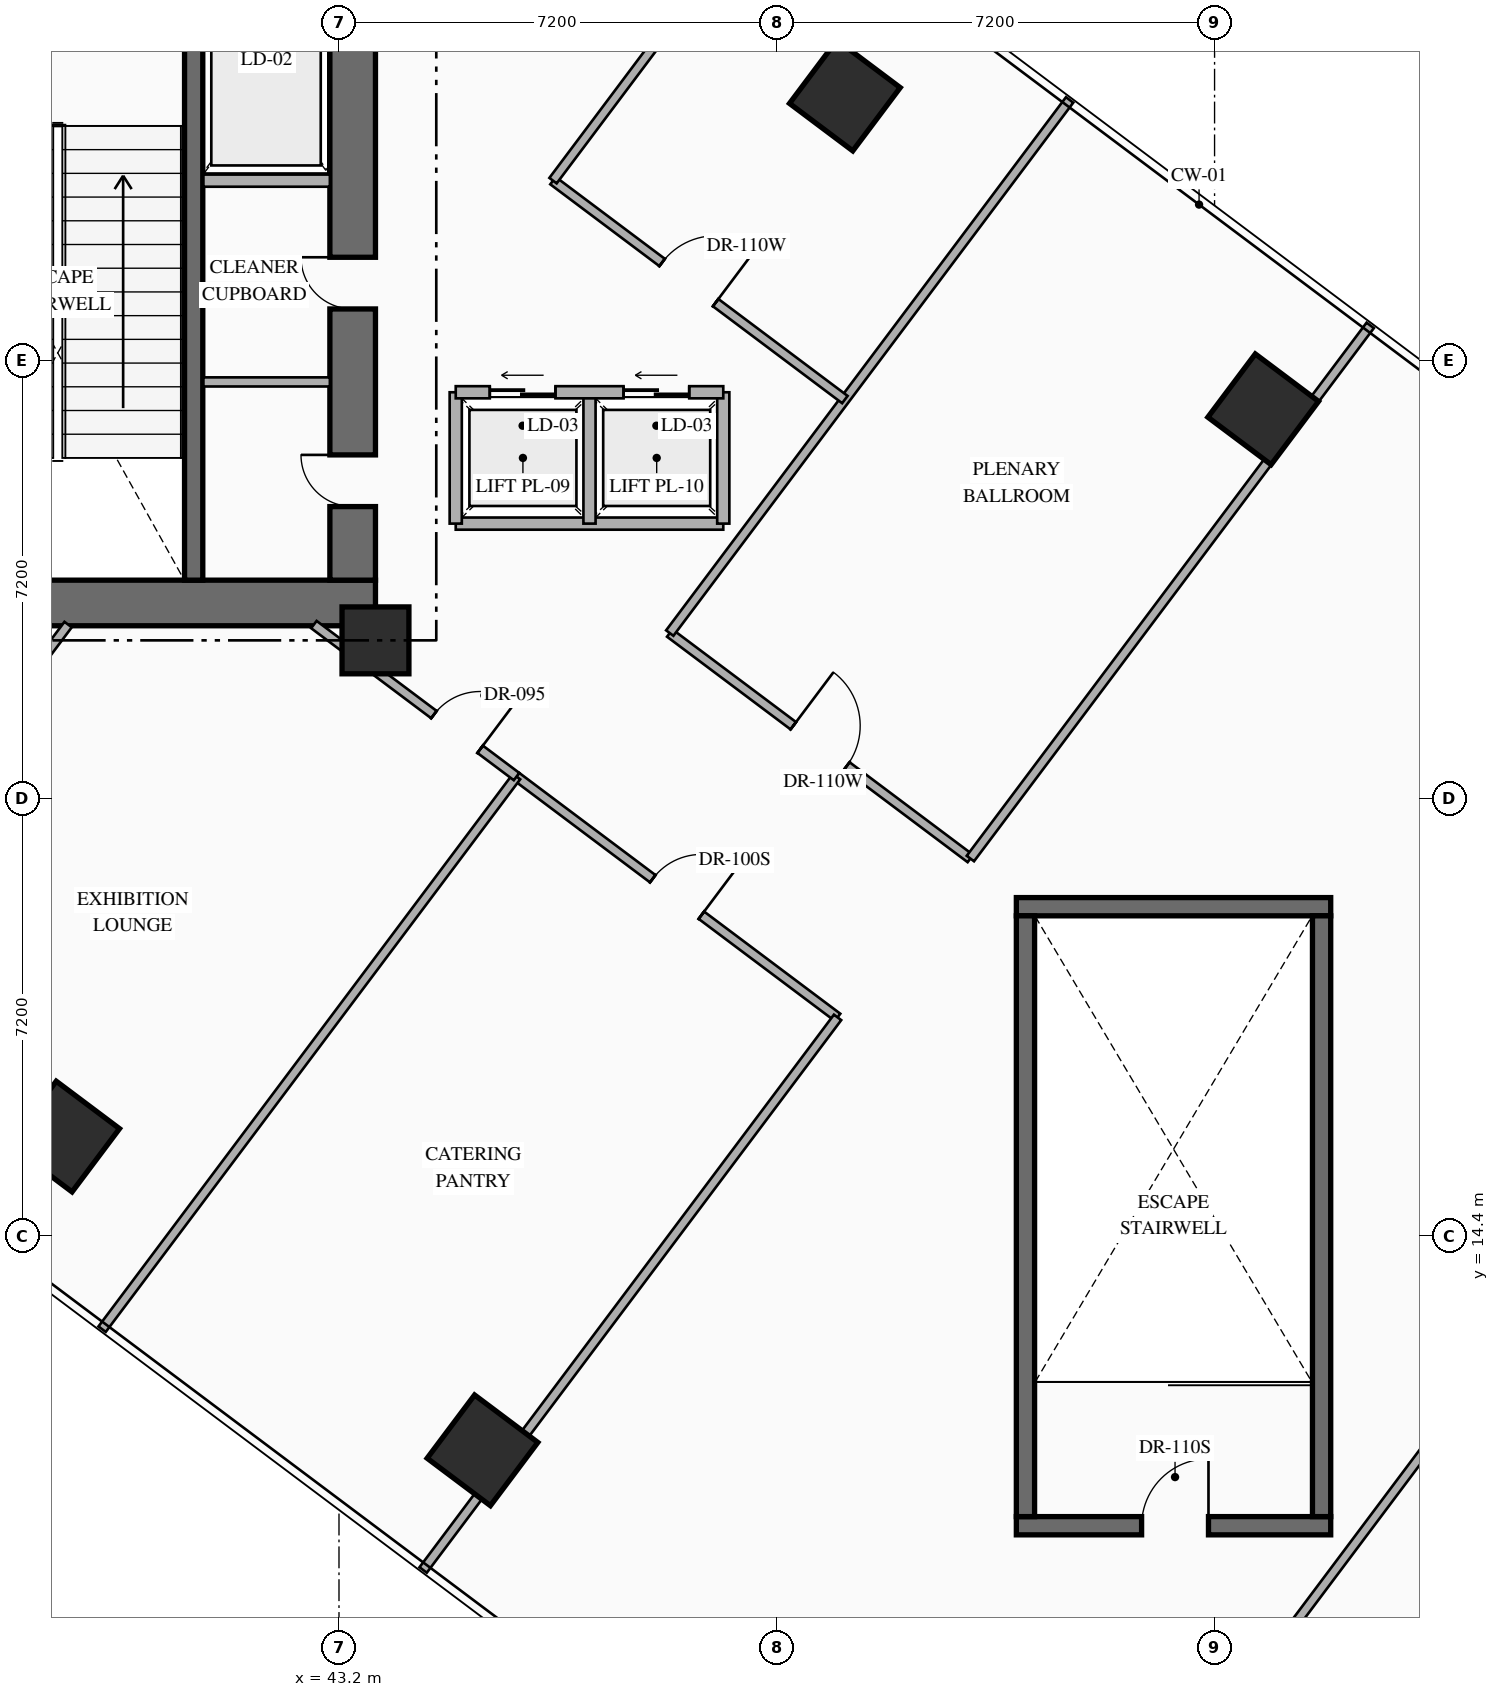
"""IFC4 building model, lengths in metres.
Left out: names, types, materials, properties, quantities, classifications, styles, units other than length and angle.
Written with IfcOpenShell. Run it as: python <this file> out.ifc"""

import sys

from ifc_helpers import new_model, si_unit, direction, frame, frame_2d, origin, origin_2d, place, context, subcontext, project, spatial, rectangle, extrude, element, fill, save


model = new_model("IFC4")
c1 = context("Model", 3, precision=1e-05, world=origin(), true_north=direction((0.0, 1.0)))
c2 = subcontext(c1, "Body", "Model", "MODEL_VIEW")
j1 = project(units=[si_unit("LENGTHUNIT", "METRE"), si_unit("PLANEANGLEUNIT", "RADIAN")], contexts=[c1])
p1 = place(None, origin())
s1 = spatial("IfcSite", under=j1, at=p1, CompositionType="ELEMENT")
p2 = place(p1, origin())
s2 = spatial("IfcBuilding", under=s1, at=p2, CompositionType="ELEMENT")
p3 = place(p2, frame((0.0, 0.0, 21.6)))
s3 = spatial("IfcBuildingStorey", under=s2, at=p3, CompositionType="ELEMENT", Elevation=21.6)
p4 = place(p3, frame((35.74, 24.815, 0.0), z_axis=(0.0, 0.0, 1.0), x_axis=(1.0, 0.0, 0.0)))
e1 = element("IfcWall", 1, at=p4, inside=s3, PredefinedType="SHEAR", context=c2, shape_type="SweptSolid", body=[
    extrude(rectangle(XDim=8.06, YDim=0.75, at=frame_2d((4.03, 0.0))), origin(), (0.0, 0.0, 1.0), 5.4),
])
p5 = place(p3, frame((43.425, 25.19, 0.0), z_axis=(0.0, 0.0, 1.0), x_axis=(0.0, 1.0, 0.0)))
e2 = element("IfcWall", 2, at=p5, inside=s3, PredefinedType="SHEAR", context=c2, shape_type="SweptSolid", body=[
    extrude(rectangle(XDim=9.48, YDim=0.75, at=frame_2d((4.74, 0.0))), origin(), (0.0, 0.0, 1.0), 5.4),
])
p6 = place(p5, frame((1.21, 0.0, 0.0)))
e3 = element("IfcOpeningElement", 3, at=p6, cuts=e2, PredefinedType="OPENING", context=c2, shape_type="SweptSolid", body=[
    extrude(rectangle(XDim=0.85, YDim=2.08, at=frame_2d((0.425, 1.04))), frame((0.0, 0.385, 0.0), z_axis=(0.0, -1.0, 0.0), x_axis=(1.0, 0.0, 0.0)), (0.0, 0.0, 1.0), 0.77),
])
p7 = place(p5, frame((4.46, 0.0, 0.0)))
e4 = element("IfcOpeningElement", 4, at=p7, cuts=e2, PredefinedType="OPENING", context=c2, shape_type="SweptSolid", body=[
    extrude(rectangle(XDim=0.85, YDim=2.08, at=frame_2d((0.425, 1.04))), frame((0.0, 0.385, 0.0), z_axis=(0.0, -1.0, 0.0), x_axis=(1.0, 0.0, 0.0)), (0.0, 0.0, 1.0), 0.77),
])
p8 = place(p3, frame((40.81, 25.19, 0.0), z_axis=(0.0, 0.0, 1.0), x_axis=(0.0, 1.0, 0.0)))
e5 = element("IfcWall", 5, at=p8, inside=s3, PredefinedType="SHEAR", context=c2, shape_type="SweptSolid", body=[
    extrude(rectangle(XDim=9.48, YDim=0.3, at=frame_2d((4.74, 0.0))), origin(), (0.0, 0.0, 1.0), 5.4),
])
p9 = place(p3, frame((54.34, 9.64, 0.0), z_axis=(0.0, 0.0, 1.0), x_axis=(1.0, 0.0, 0.0)))
e6 = element("IfcWall", 6, at=p9, inside=s3, PredefinedType="SHEAR", context=c2, shape_type="SweptSolid", body=[
    extrude(rectangle(XDim=5.17, YDim=0.3, at=frame_2d((2.585, 0.0))), origin(), (0.0, 0.0, 1.0), 5.1),
])
p10 = place(p9, frame((2.06, 0.0, 0.0)))
e7 = element("IfcOpeningElement", 7, at=p10, cuts=e6, PredefinedType="OPENING", context=c2, shape_type="SweptSolid", body=[
    extrude(rectangle(XDim=1.1, YDim=2.2, at=frame_2d((0.55, 1.1))), frame((0.0, 0.16, 0.0), z_axis=(0.0, -1.0, 0.0), x_axis=(1.0, 0.0, 0.0)), (0.0, 0.0, 1.0), 0.32),
])
p11 = place(p3, frame((54.34, 19.82, 0.0), z_axis=(0.0, 0.0, 1.0), x_axis=(1.0, 0.0, 0.0)))
e8 = element("IfcWall", 8, at=p11, inside=s3, PredefinedType="SHEAR", context=c2, shape_type="SweptSolid", body=[
    extrude(rectangle(XDim=5.17, YDim=0.3, at=frame_2d((2.585, 0.0))), origin(), (0.0, 0.0, 1.0), 5.1),
])
for number, where, z_axis, x_axis in (
    (9, (54.49, 9.79, 0.0), (0.0, 0.0, 1.0), (0.0, 1.0, 0.0)),
    (10, (59.36, 9.79, 0.0), (0.0, 0.0, 1.0), (0.0, 1.0, 0.0)),
):
    element("IfcWall", number, at=place(p3, frame(where, z_axis=z_axis, x_axis=x_axis)), inside=s3, PredefinedType="SHEAR", context=c2, shape_type="SweptSolid", body=[
        extrude(rectangle(XDim=9.88, YDim=0.3, at=frame_2d((4.94, 0.0))), origin(), (0.0, 0.0, 1.0), 5.1),
    ])
p12 = place(p3, frame((43.8, 24.2, 0.0), z_axis=(0.0, 0.0, 1.0), x_axis=(1.0, 0.0, 0.0)))
e11 = element("IfcColumn", 11, at=p12, inside=s3, PredefinedType="COLUMN", context=c2, shape_type="SweptSolid", body=[
    extrude(rectangle(XDim=1.1, YDim=1.1, at=origin_2d()), origin(), (0.0, 0.0, 1.0), 5.4),
])
for number, where, z_axis, x_axis in (
    (12, (38.68, 16.04, 0.0), (0.0, 0.0, 1.0), (0.8, -0.6, 0.0)),
    (13, (51.52, 33.16, 0.0), (0.0, 0.0, 1.0), (0.8, -0.6, 0.0)),
    (14, (45.56, 10.88, 0.0), (0.0, 0.0, 1.0), (0.8, -0.6, 0.0)),
    (15, (58.4, 28.0, 0.0), (0.0, 0.0, 1.0), (0.8, -0.6, 0.0)),
):
    element("IfcColumn", number, at=place(p3, frame(where, z_axis=z_axis, x_axis=x_axis)), inside=s3, PredefinedType="COLUMN", context=c2, shape_type="SweptSolid", body=[
        extrude(rectangle(XDim=1.3, YDim=1.3, at=origin_2d()), origin(), (0.0, 0.0, 1.0), 5.4),
    ])
p13 = place(p3, frame((40.97, 31.76, 0.0), z_axis=(0.0, 0.0, 1.0), x_axis=(1.0, 0.0, 0.0)))
e16 = element("IfcWall", 16, at=p13, inside=s3, PredefinedType="STANDARD", context=c2, shape_type="SweptSolid", body=[
    extrude(rectangle(XDim=2.08, YDim=0.2, at=frame_2d((1.04, 0.0))), origin(), (0.0, 0.0, 1.0), 5.1),
])
p14 = place(p3, frame((40.97, 28.45, 0.0), z_axis=(0.0, 0.0, 1.0), x_axis=(1.0, 0.0, 0.0)))
e17 = element("IfcWall", 17, at=p14, inside=s3, PredefinedType="PARTITIONING", context=c2, shape_type="SweptSolid", body=[
    extrude(rectangle(XDim=2.08, YDim=0.15, at=frame_2d((1.04, 0.0))), origin(), (0.0, 0.0, 1.0), 5.1),
])
p15 = place(p3, frame((45.12, 26.12, 0.0), z_axis=(0.0, 0.0, 1.0), x_axis=(1.0, 0.0, 0.0)))
e18 = element("IfcWall", 18, at=p15, inside=s3, PredefinedType="STANDARD", context=c2, shape_type="SweptSolid", body=[
    extrude(rectangle(XDim=4.4, YDim=0.2, at=frame_2d((2.2, 0.0))), origin(), (0.0, 0.0, 1.0), 5.1),
])
for number, where, z_axis, x_axis in (
    (19, (45.12, 26.12, 0.0), (0.0, 0.0, 1.0), (0.0, 1.0, 0.0)),
    (20, (49.52, 26.12, 0.0), (0.0, 0.0, 1.0), (0.0, 1.0, 0.0)),
    (21, (47.32, 26.12, 0.0), (0.0, 0.0, 1.0), (0.0, 1.0, 0.0)),
):
    element("IfcWall", number, at=place(p3, frame(where, z_axis=z_axis, x_axis=x_axis)), inside=s3, PredefinedType="STANDARD", context=c2, shape_type="SweptSolid", body=[
        extrude(rectangle(XDim=2.16, YDim=0.2, at=frame_2d((1.08, 0.0))), origin(), (0.0, 0.0, 1.0), 5.1),
    ])
p16 = place(p3, frame((45.12, 28.28, 0.0), z_axis=(0.0, 0.0, 1.0), x_axis=(1.0, 0.0, 0.0)))
e22 = element("IfcWall", 22, at=p16, inside=s3, PredefinedType="STANDARD", context=c2, shape_type="SweptSolid", body=[
    extrude(rectangle(XDim=4.4, YDim=0.2, at=frame_2d((2.2, 0.0))), origin(), (0.0, 0.0, 1.0), 5.1),
])
p17 = place(p16, frame((0.56, 0.0, 0.0)))
e23 = element("IfcOpeningElement", 23, at=p17, cuts=e22, PredefinedType="OPENING", context=c2, shape_type="SweptSolid", body=[
    extrude(rectangle(XDim=1.08, YDim=2.15, at=frame_2d((0.54, 1.075))), frame((0.0, 0.11, 0.0), z_axis=(0.0, -1.0, 0.0), x_axis=(1.0, 0.0, 0.0)), (0.0, 0.0, 1.0), 0.22),
])
p18 = place(p16, frame((2.76, 0.0, 0.0)))
e24 = element("IfcOpeningElement", 24, at=p18, cuts=e22, PredefinedType="OPENING", context=c2, shape_type="SweptSolid", body=[
    extrude(rectangle(XDim=1.08, YDim=2.15, at=frame_2d((0.54, 1.075))), frame((0.0, 0.11, 0.0), z_axis=(0.0, -1.0, 0.0), x_axis=(1.0, 0.0, 0.0)), (0.0, 0.0, 1.0), 0.22),
])
p19 = place(p3, frame((48.64, 24.32, 0.0), z_axis=(0.0, 0.0, 1.0), x_axis=(0.80000474051, -0.599993679268, 0.0)))
e25 = element("IfcWall", 25, at=p19, inside=s3, PredefinedType="PARTITIONING", context=c2, shape_type="SweptSolid", body=[
    extrude(rectangle(XDim=6.18, YDim=0.15, at=frame_2d((3.09, 0.0))), origin(), (0.0, 0.0, 1.0), 5.1),
])
p20 = place(p19, frame((2.54, 0.0, 0.0)))
e26 = element("IfcOpeningElement", 26, at=p20, cuts=e25, PredefinedType="OPENING", context=c2, shape_type="SweptSolid", body=[
    extrude(rectangle(XDim=1.1, YDim=2.16, at=frame_2d((0.55, 1.08))), frame((0.0, 0.085, 0.0), z_axis=(0.0, -1.0, 0.0), x_axis=(1.0, 0.0, 0.0)), (0.0, 0.0, 1.0), 0.17),
])
p21 = place(p3, frame((48.64, 24.32, 0.0), z_axis=(0.0, 0.0, 1.0), x_axis=(0.600017820398, 0.799986634391, 0.0)))
e27 = element("IfcWall", 27, at=p21, inside=s3, PredefinedType="PARTITIONING", context=c2, shape_type="SweptSolid", body=[
    extrude(rectangle(XDim=10.96, YDim=0.15, at=frame_2d((5.48, 0.0))), origin(), (0.0, 0.0, 1.0), 5.1),
])
p22 = place(p3, frame((53.584, 20.612, 0.0), z_axis=(0.0, 0.0, 1.0), x_axis=(0.600003564151, 0.799997326874, 0.0)))
e28 = element("IfcWall", 28, at=p22, inside=s3, PredefinedType="PARTITIONING", context=c2, shape_type="SweptSolid", body=[
    extrude(rectangle(XDim=10.96, YDim=0.15, at=frame_2d((5.48, 0.0))), origin(), (0.0, 0.0, 1.0), 5.1),
])
p23 = place(p3, frame((46.12, 21.96, 0.0), z_axis=(0.0, 0.0, 1.0), x_axis=(0.799991121809, -0.600011837406, 0.0)))
e29 = element("IfcWall", 29, at=p23, inside=s3, PredefinedType="PARTITIONING", context=c2, shape_type="SweptSolid", body=[
    extrude(rectangle(XDim=6.6, YDim=0.15, at=frame_2d((3.3, 0.0))), origin(), (0.0, 0.0, 1.0), 3.295),
])
p24 = place(p23, frame((2.8, 0.0, 0.0)))
e30 = element("IfcOpeningElement", 30, at=p24, cuts=e29, PredefinedType="OPENING", context=c2, shape_type="SweptSolid", body=[
    extrude(rectangle(XDim=1.0, YDim=2.15, at=frame_2d((0.5, 1.075))), frame((0.0, 0.085, 0.0), z_axis=(0.0, -1.0, 0.0), x_axis=(1.0, 0.0, 0.0)), (0.0, 0.0, 1.0), 0.17),
])
p25 = place(p3, frame((39.304, 12.872, 0.0), z_axis=(0.0, 0.0, 1.0), x_axis=(0.600013754301, 0.79998968409, 0.0)))
e31 = element("IfcWall", 31, at=p25, inside=s3, PredefinedType="PARTITIONING", context=c2, shape_type="SweptSolid", body=[
    extrude(rectangle(XDim=11.36, YDim=0.15, at=frame_2d((5.68, 0.0))), origin(), (0.0, 0.0, 1.0), 5.1),
])
p26 = place(p3, frame((44.584, 8.912, 0.0), z_axis=(0.0, 0.0, 1.0), x_axis=(0.6, 0.8, 0.0)))
e32 = element("IfcWall", 32, at=p26, inside=s3, PredefinedType="PARTITIONING", context=c2, shape_type="SweptSolid", body=[
    extrude(rectangle(XDim=11.36, YDim=0.15, at=frame_2d((5.68, 0.0))), origin(), (0.0, 0.0, 1.0), 3.295),
])
p27 = place(p3, frame((54.184, 1.712, 0.0), z_axis=(0.0, 0.0, 1.0), x_axis=(0.59999392496, 0.800004556244, 0.0)))
e33 = element("IfcWall", 33, at=p27, inside=s3, PredefinedType="PARTITIONING", context=c2, shape_type="SweptSolid", body=[
    extrude(rectangle(XDim=25.72, YDim=0.15, at=frame_2d((12.86, 0.0))), origin(), (0.0, 0.0, 1.0), 5.1),
])
p28 = place(p27, frame((12.31, 0.0, 0.0)))
e34 = element("IfcOpeningElement", 34, at=p28, cuts=e33, PredefinedType="OPENING", context=c2, shape_type="SweptSolid", body=[
    extrude(rectangle(XDim=1.1, YDim=2.24, at=frame_2d((0.55, 1.12))), frame((0.0, 0.085, 0.0), z_axis=(0.0, -1.0, 0.0), x_axis=(1.0, 0.0, 0.0)), (0.0, 0.0, 1.0), 0.17),
])
p29 = place(p3, frame((46.72, 31.76, 0.0), z_axis=(0.0, 0.0, 1.0), x_axis=(0.79999511724, -0.600006510291, 0.0)))
e35 = element("IfcWall", 35, at=p29, inside=s3, PredefinedType="PARTITIONING", context=c2, shape_type="SweptSolid", body=[
    extrude(rectangle(XDim=6.0, YDim=0.15, at=frame_2d((3.0, 0.0))), origin(), (0.0, 0.0, 1.0), 5.1),
])
p30 = place(p29, frame((2.243, 0.0, 0.0)))
e36 = element("IfcOpeningElement", 36, at=p30, cuts=e35, PredefinedType="OPENING", context=c2, shape_type="SweptSolid", body=[
    extrude(rectangle(XDim=1.1, YDim=2.16, at=frame_2d((0.55, 1.08))), frame((0.0, 0.085, 0.0), z_axis=(0.0, -1.0, 0.0), x_axis=(1.0, 0.0, 0.0)), (0.0, 0.0, 1.0), 0.17),
])
p31 = place(p3, frame((46.72, 31.76, 0.0), z_axis=(0.0, 0.0, 1.0), x_axis=(0.600006341286, 0.799995243996, 0.0)))
e37 = element("IfcWall", 37, at=p31, inside=s3, PredefinedType="PARTITIONING", context=c2, shape_type="SweptSolid", body=[
    extrude(rectangle(XDim=6.16, YDim=0.15, at=frame_2d((3.08, 0.0))), origin(), (0.0, 0.0, 1.0), 5.1),
])
p32 = place(p3, frame((42.787, 24.46, 0.0), z_axis=(0.0, 0.0, 1.0), x_axis=(0.799971872363, -0.600037501685, 0.0)))
e38 = element("IfcWall", 38, at=p32, inside=s3, PredefinedType="PARTITIONING", context=c2, shape_type="SweptSolid", body=[
    extrude(rectangle(XDim=4.167, YDim=0.15, at=frame_2d((2.083, 0.0))), origin(), (0.0, 0.0, 1.0), 3.295),
])
p33 = place(p32, frame((2.468, 0.0, 0.0)))
e39 = element("IfcOpeningElement", 39, at=p33, cuts=e38, PredefinedType="OPENING", context=c2, shape_type="SweptSolid", body=[
    extrude(rectangle(XDim=0.95, YDim=2.15, at=frame_2d((0.475, 1.075))), frame((0.0, 0.085, 0.0), z_axis=(0.0, -1.0, 0.0), x_axis=(1.0, 0.0, 0.0)), (0.0, 0.0, 1.0), 0.17),
])
p34 = place(p3, frame((33.384, 17.312, 0.0), z_axis=(0.0, 0.0, 1.0), x_axis=(0.600008743659, 0.799993442181, 0.0)))
e40 = element("IfcWall", 40, at=p34, inside=s3, PredefinedType="PARTITIONING", context=c2, shape_type="SweptSolid", body=[
    extrude(rectangle(XDim=8.935, YDim=0.15, at=frame_2d((4.468, 0.0))), origin(), (0.0, 0.0, 1.0), 5.1),
])
p35 = place(p6, origin())
e41 = element("IfcDoor", 41, at=p35, inside=s3, OperationType="SINGLE_SWING_RIGHT", PredefinedType="DOOR", context=c2, shape_type="SweptSolid", body=[
    extrude(rectangle(XDim=0.85, YDim=2.08, at=frame_2d((0.425, 1.04))), frame((0.0, 0.025, 0.0), z_axis=(0.0, -1.0, 0.0), x_axis=(1.0, 0.0, 0.0)), (0.0, 0.0, 1.0), 0.05),
])
fill(e3, e41)
p36 = place(p7, origin())
e42 = element("IfcDoor", 42, at=p36, inside=s3, OperationType="SINGLE_SWING_RIGHT", PredefinedType="DOOR", context=c2, shape_type="SweptSolid", body=[
    extrude(rectangle(XDim=0.85, YDim=2.08, at=frame_2d((0.425, 1.04))), frame((0.0, 0.025, 0.0), z_axis=(0.0, -1.0, 0.0), x_axis=(1.0, 0.0, 0.0)), (0.0, 0.0, 1.0), 0.05),
])
fill(e4, e42)
p37 = place(p10, origin())
e43 = element("IfcDoor", 43, at=p37, inside=s3, OperationType="SINGLE_SWING_RIGHT", PredefinedType="DOOR", context=c2, shape_type="SweptSolid", body=[
    extrude(rectangle(XDim=1.1, YDim=2.2, at=frame_2d((0.55, 1.1))), frame((0.0, 0.025, 0.0), z_axis=(0.0, -1.0, 0.0), x_axis=(1.0, 0.0, 0.0)), (0.0, 0.0, 1.0), 0.05),
])
fill(e7, e43)
p38 = place(p17, origin())
e44 = element("IfcDoor", 44, at=p38, inside=s3, OperationType="SLIDING_TO_LEFT", PredefinedType="USERDEFINED", context=c2, shape_type="SweptSolid", body=[
    extrude(rectangle(XDim=1.08, YDim=2.15, at=frame_2d((0.54, 1.075))), frame((0.0, 0.025, 0.0), z_axis=(0.0, -1.0, 0.0), x_axis=(1.0, 0.0, 0.0)), (0.0, 0.0, 1.0), 0.05),
])
fill(e23, e44)
p39 = place(p18, origin())
e45 = element("IfcDoor", 45, at=p39, inside=s3, OperationType="SLIDING_TO_LEFT", PredefinedType="USERDEFINED", context=c2, shape_type="SweptSolid", body=[
    extrude(rectangle(XDim=1.08, YDim=2.15, at=frame_2d((0.54, 1.075))), frame((0.0, 0.025, 0.0), z_axis=(0.0, -1.0, 0.0), x_axis=(1.0, 0.0, 0.0)), (0.0, 0.0, 1.0), 0.05),
])
fill(e24, e45)
p40 = place(p20, origin())
e46 = element("IfcDoor", 46, at=p40, inside=s3, OperationType="SINGLE_SWING_LEFT", PredefinedType="DOOR", context=c2, shape_type="SweptSolid", body=[
    extrude(rectangle(XDim=1.1, YDim=2.16, at=frame_2d((0.55, 1.08))), frame((0.0, 0.025, 0.0), z_axis=(0.0, -1.0, 0.0), x_axis=(1.0, 0.0, 0.0)), (0.0, 0.0, 1.0), 0.05),
])
fill(e26, e46)
p41 = place(p24, origin())
e47 = element("IfcDoor", 47, at=p41, inside=s3, OperationType="SINGLE_SWING_RIGHT", PredefinedType="DOOR", context=c2, shape_type="SweptSolid", body=[
    extrude(rectangle(XDim=1.0, YDim=2.15, at=frame_2d((0.5, 1.075))), frame((0.0, 0.025, 0.0), z_axis=(0.0, -1.0, 0.0), x_axis=(1.0, 0.0, 0.0)), (0.0, 0.0, 1.0), 0.05),
])
fill(e30, e47)
p42 = place(p30, origin())
e48 = element("IfcDoor", 48, at=p42, inside=s3, OperationType="SINGLE_SWING_RIGHT", PredefinedType="DOOR", context=c2, shape_type="SweptSolid", body=[
    extrude(rectangle(XDim=1.1, YDim=2.16, at=frame_2d((0.55, 1.08))), frame((0.0, 0.025, 0.0), z_axis=(0.0, -1.0, 0.0), x_axis=(1.0, 0.0, 0.0)), (0.0, 0.0, 1.0), 0.05),
])
fill(e36, e48)
p43 = place(p33, origin())
e49 = element("IfcDoor", 49, at=p43, inside=s3, OperationType="SINGLE_SWING_RIGHT", PredefinedType="DOOR", context=c2, shape_type="SweptSolid", body=[
    extrude(rectangle(XDim=0.95, YDim=2.15, at=frame_2d((0.475, 1.075))), frame((0.0, 0.025, 0.0), z_axis=(0.0, -1.0, 0.0), x_axis=(1.0, 0.0, 0.0)), (0.0, 0.0, 1.0), 0.05),
])
fill(e39, e49)
save(model, sys.argv[1])
